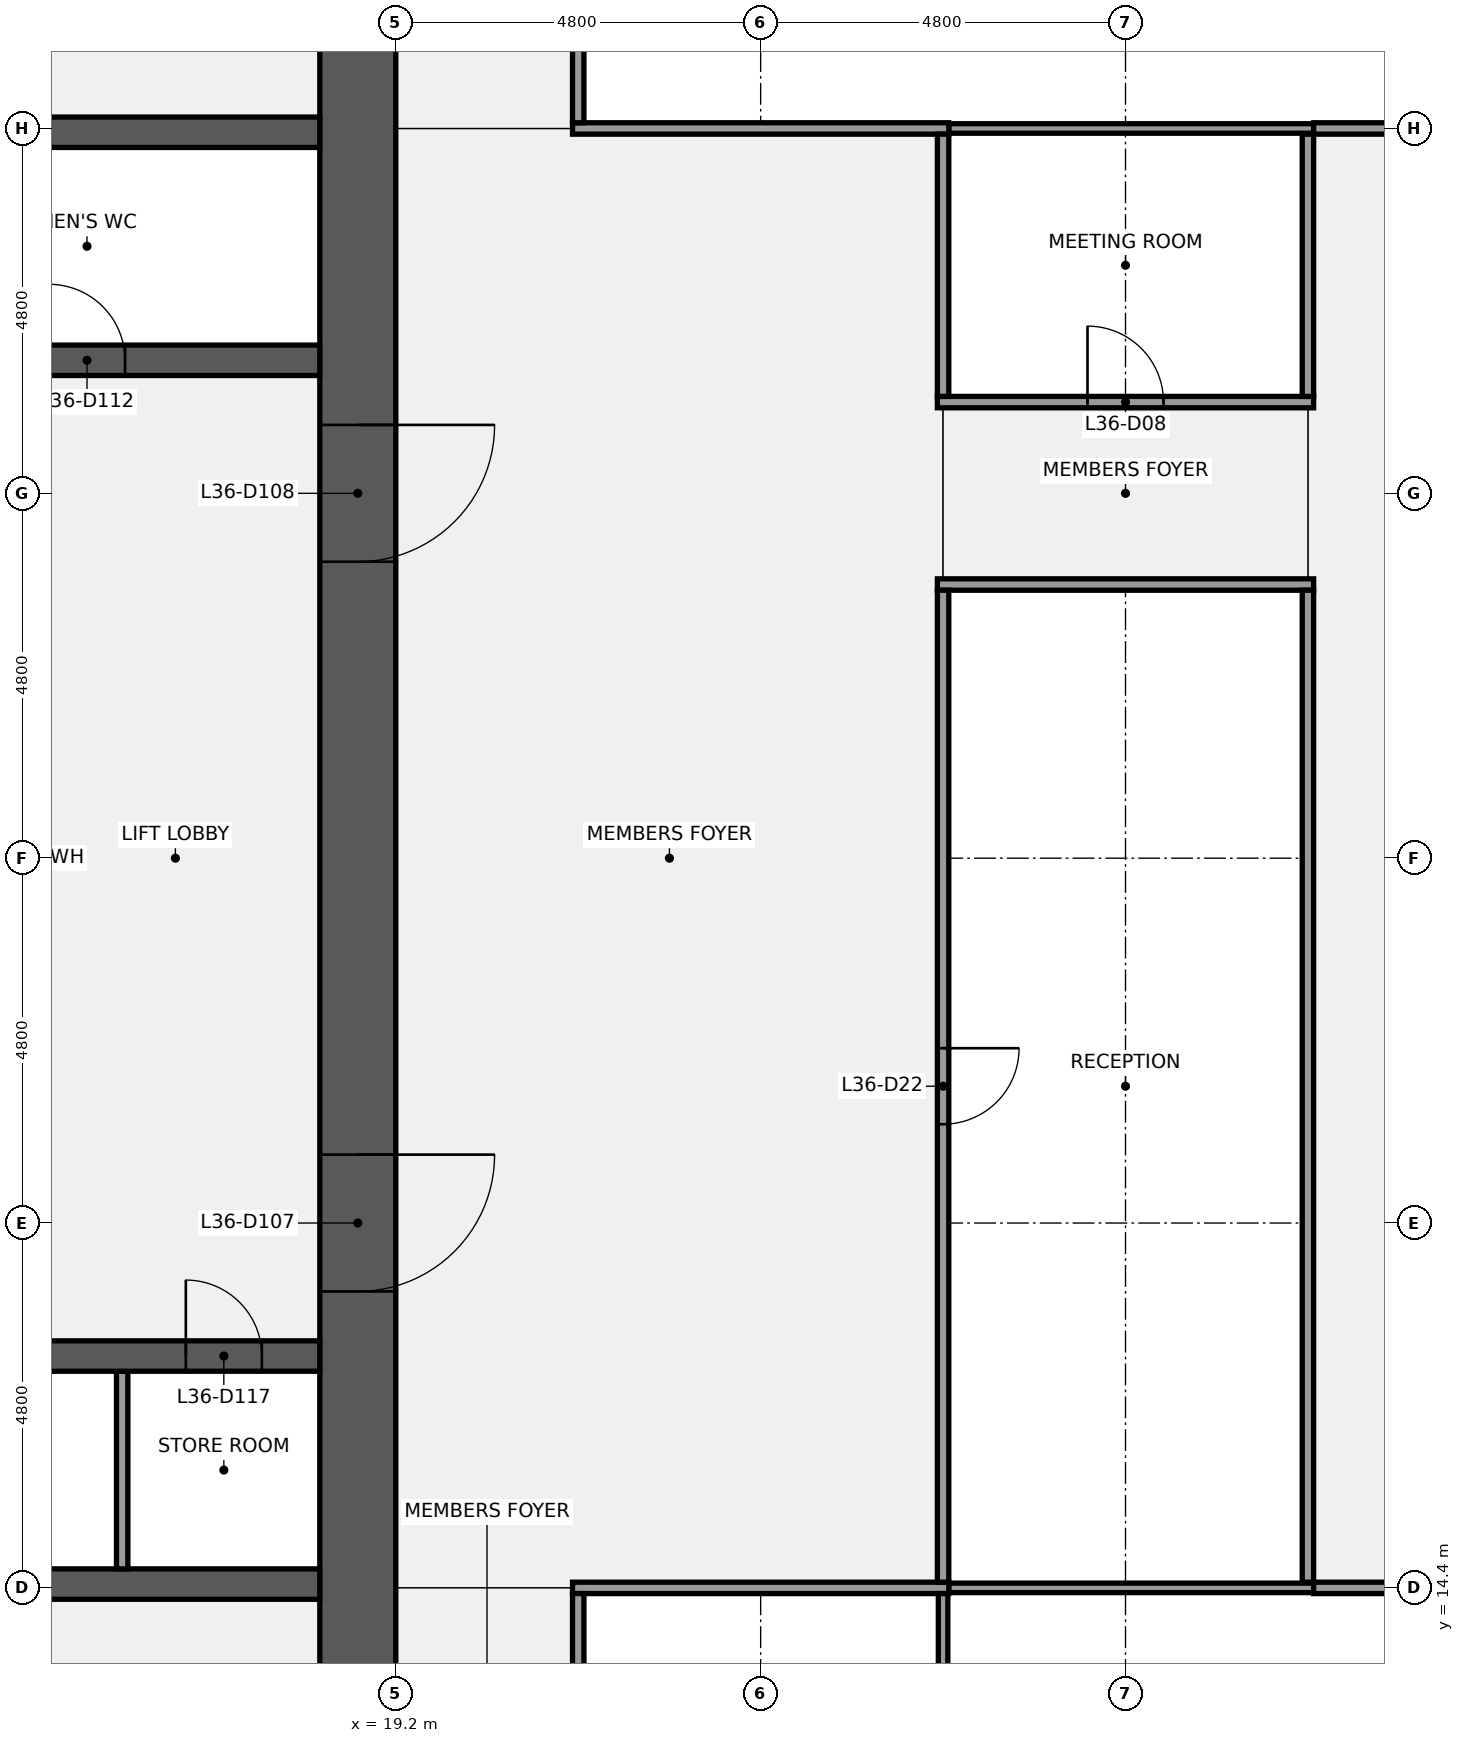
"""IFC4 building model, lengths in metres.
Left out: names, types, materials, properties, quantities, classifications, styles, units other than length and angle.
Written with IfcOpenShell. Run it as: python <this file> out.ifc"""

import sys

from ifc_helpers import new_model, si_unit, direction, frame, frame_2d, origin, place, context, subcontext, project, spatial, rectangle, extrude, element, fill, save


model = new_model("IFC4")
c1 = context("Model", 3, precision=1e-05, world=origin(), true_north=direction((0.0, 1.0)))
c2 = subcontext(c1, "Body", "Model", "MODEL_VIEW")
j1 = project(units=[si_unit("LENGTHUNIT", "METRE"), si_unit("PLANEANGLEUNIT", "RADIAN")], contexts=[c1])
p1 = place(None, origin())
s1 = spatial("IfcSite", under=j1, at=p1, CompositionType="ELEMENT")
p2 = place(p1, origin())
s2 = spatial("IfcBuilding", under=s1, at=p2, CompositionType="ELEMENT")
p3 = place(p2, frame((0.0, 0.0, 164.1)))
s3 = spatial("IfcBuildingStorey", under=s2, at=p3, CompositionType="ELEMENT", Elevation=164.1)
p4 = place(p3, frame((18.7, 38.4, 0.0), z_axis=(0.0, 0.0, 1.0), x_axis=(0.0, -1.0, 0.0)))
e1 = element("IfcWall", 1, at=p4, inside=s3, PredefinedType="SHEAR", context=c2, shape_type="SweptSolid", body=[
    extrude(rectangle(XDim=28.8, YDim=1.0, at=frame_2d((14.4, 0.0))), origin(), (0.0, 0.0, 1.0), 3.84),
])
p5 = place(p4, frame((18.3, 0.0, 0.0)))
e2 = element("IfcOpeningElement", 2, at=p5, cuts=e1, PredefinedType="OPENING", context=c2, shape_type="SweptSolid", body=[
    extrude(rectangle(XDim=1.8, YDim=2.1, at=frame_2d((0.9, 1.05))), frame((0.0, 0.51, 0.0), z_axis=(0.0, -1.0, 0.0), x_axis=(1.0, 0.0, 0.0)), (0.0, 0.0, 1.0), 1.02),
])
p6 = place(p4, frame((8.7, 0.0, 0.0)))
e3 = element("IfcOpeningElement", 3, at=p6, cuts=e1, PredefinedType="OPENING", context=c2, shape_type="SweptSolid", body=[
    extrude(rectangle(XDim=1.8, YDim=2.1, at=frame_2d((0.9, 1.05))), frame((0.0, 0.51, 0.0), z_axis=(0.0, -1.0, 0.0), x_axis=(1.0, 0.0, 0.0)), (0.0, 0.0, 1.0), 1.02),
])
p7 = place(p3, frame((1.0, 14.45, 0.0), z_axis=(0.0, 0.0, 1.0), x_axis=(1.0, 0.0, 0.0)))
e4 = element("IfcWall", 4, at=p7, inside=s3, PredefinedType="SHEAR", context=c2, shape_type="SweptSolid", body=[
    extrude(rectangle(XDim=17.2, YDim=0.4, at=frame_2d((8.6, 0.0))), origin(), (0.0, 0.0, 1.0), 3.84),
])
p8 = place(p3, frame((15.6, 14.65, 0.0), z_axis=(0.0, 0.0, 1.0), x_axis=(0.0, 1.0, 0.0)))
e5 = element("IfcWall", 5, at=p8, inside=s3, PredefinedType="PARTITIONING", context=c2, shape_type="SweptSolid", body=[
    extrude(rectangle(XDim=2.6, YDim=0.15, at=frame_2d((1.3, 0.0))), origin(), (0.0, 0.0, 1.0), 3.84),
])
p9 = place(p3, frame((1.0, 17.45, 0.0), z_axis=(0.0, 0.0, 1.0), x_axis=(1.0, 0.0, 0.0)))
e6 = element("IfcWall", 6, at=p9, inside=s3, PredefinedType="SHEAR", context=c2, shape_type="SweptSolid", body=[
    extrude(rectangle(XDim=17.2, YDim=0.4, at=frame_2d((8.6, 0.0))), origin(), (0.0, 0.0, 1.0), 3.84),
])
p10 = place(p9, frame((0.762, 0.0, 0.0)))
e7 = element("IfcOpeningElement", 7, at=p10, cuts=e6, PredefinedType="OPENING", context=c2, shape_type="SweptSolid", body=[
    extrude(rectangle(XDim=1.0, YDim=2.1, at=frame_2d((0.5, 1.05))), frame((0.0, 0.21, 0.0), z_axis=(0.0, -1.0, 0.0), x_axis=(1.0, 0.0, 0.0)), (0.0, 0.0, 1.0), 0.42),
])
p11 = place(p9, frame((3.6, 0.0, 0.0)))
e8 = element("IfcOpeningElement", 8, at=p11, cuts=e6, PredefinedType="OPENING", context=c2, shape_type="SweptSolid", body=[
    extrude(rectangle(XDim=1.0, YDim=2.1, at=frame_2d((0.5, 1.05))), frame((0.0, 0.21, 0.0), z_axis=(0.0, -1.0, 0.0), x_axis=(1.0, 0.0, 0.0)), (0.0, 0.0, 1.0), 0.42),
])
p12 = place(p9, frame((6.6, 0.0, 0.0)))
e9 = element("IfcOpeningElement", 9, at=p12, cuts=e6, PredefinedType="OPENING", context=c2, shape_type="SweptSolid", body=[
    extrude(rectangle(XDim=1.0, YDim=2.1, at=frame_2d((0.5, 1.05))), frame((0.0, 0.21, 0.0), z_axis=(0.0, -1.0, 0.0), x_axis=(1.0, 0.0, 0.0)), (0.0, 0.0, 1.0), 0.42),
])
p13 = place(p9, frame((11.1, 0.0, 0.0)))
e10 = element("IfcOpeningElement", 10, at=p13, cuts=e6, PredefinedType="OPENING", context=c2, shape_type="SweptSolid", body=[
    extrude(rectangle(XDim=1.0, YDim=2.1, at=frame_2d((0.5, 1.05))), frame((0.0, 0.21, 0.0), z_axis=(0.0, -1.0, 0.0), x_axis=(1.0, 0.0, 0.0)), (0.0, 0.0, 1.0), 0.42),
])
p14 = place(p9, frame((15.438, 0.0, 0.0)))
e11 = element("IfcOpeningElement", 11, at=p14, cuts=e6, PredefinedType="OPENING", context=c2, shape_type="SweptSolid", body=[
    extrude(rectangle(XDim=1.0, YDim=2.1, at=frame_2d((0.5, 1.05))), frame((0.0, 0.21, 0.0), z_axis=(0.0, -1.0, 0.0), x_axis=(1.0, 0.0, 0.0)), (0.0, 0.0, 1.0), 0.42),
])
p15 = place(p3, frame((1.0, 30.55, 0.0), z_axis=(0.0, 0.0, 1.0), x_axis=(1.0, 0.0, 0.0)))
e12 = element("IfcWall", 12, at=p15, inside=s3, PredefinedType="SHEAR", context=c2, shape_type="SweptSolid", body=[
    extrude(rectangle(XDim=17.2, YDim=0.4, at=frame_2d((8.6, 0.0))), origin(), (0.0, 0.0, 1.0), 3.84),
])
p16 = place(p15, frame((0.762, 0.0, 0.0)))
e13 = element("IfcOpeningElement", 13, at=p16, cuts=e12, PredefinedType="OPENING", context=c2, shape_type="SweptSolid", body=[
    extrude(rectangle(XDim=1.0, YDim=2.1, at=frame_2d((0.5, 1.05))), frame((0.0, 0.21, 0.0), z_axis=(0.0, -1.0, 0.0), x_axis=(1.0, 0.0, 0.0)), (0.0, 0.0, 1.0), 0.42),
])
p17 = place(p15, frame((4.2, 0.0, 0.0)))
e14 = element("IfcOpeningElement", 14, at=p17, cuts=e12, PredefinedType="OPENING", context=c2, shape_type="SweptSolid", body=[
    extrude(rectangle(XDim=1.0, YDim=2.1, at=frame_2d((0.5, 1.05))), frame((0.0, 0.21, 0.0), z_axis=(0.0, -1.0, 0.0), x_axis=(1.0, 0.0, 0.0)), (0.0, 0.0, 1.0), 0.42),
])
p18 = place(p15, frame((8.4, 0.0, 0.0)))
e15 = element("IfcOpeningElement", 15, at=p18, cuts=e12, PredefinedType="OPENING", context=c2, shape_type="SweptSolid", body=[
    extrude(rectangle(XDim=1.0, YDim=2.1, at=frame_2d((0.5, 1.05))), frame((0.0, 0.21, 0.0), z_axis=(0.0, -1.0, 0.0), x_axis=(1.0, 0.0, 0.0)), (0.0, 0.0, 1.0), 0.42),
])
p19 = place(p15, frame((13.637, 0.0, 0.0)))
e16 = element("IfcOpeningElement", 16, at=p19, cuts=e12, PredefinedType="OPENING", context=c2, shape_type="SweptSolid", body=[
    extrude(rectangle(XDim=1.0, YDim=2.1, at=frame_2d((0.5, 1.05))), frame((0.0, 0.21, 0.0), z_axis=(0.0, -1.0, 0.0), x_axis=(1.0, 0.0, 0.0)), (0.0, 0.0, 1.0), 0.42),
])
p20 = place(p3, frame((1.0, 33.55, 0.0), z_axis=(0.0, 0.0, 1.0), x_axis=(1.0, 0.0, 0.0)))
e17 = element("IfcWall", 17, at=p20, inside=s3, PredefinedType="SHEAR", context=c2, shape_type="SweptSolid", body=[
    extrude(rectangle(XDim=17.2, YDim=0.4, at=frame_2d((8.6, 0.0))), origin(), (0.0, 0.0, 1.0), 3.84),
])
p21 = place(p3, frame((26.475, 14.4, 0.0), z_axis=(0.0, 0.0, 1.0), x_axis=(1.0, 0.0, 0.0)))
e18 = element("IfcWall", 18, at=p21, inside=s3, PredefinedType="PARTITIONING", context=c2, shape_type="SweptSolid", body=[
    extrude(rectangle(XDim=4.8, YDim=0.125, at=frame_2d((2.4, 0.0))), origin(), (0.0, 0.0, 1.0), 2.936),
])
p22 = place(p3, frame((21.525, 14.4, 0.0), z_axis=(0.0, 0.0, 1.0), x_axis=(1.0, 0.0, 0.0)))
e19 = element("IfcWall", 19, at=p22, inside=s3, PredefinedType="PARTITIONING", context=c2, shape_type="SweptSolid", body=[
    extrude(rectangle(XDim=4.95, YDim=0.15, at=frame_2d((2.475, 0.0))), origin(), (0.0, 0.0, 1.0), 2.936),
])
p23 = place(p3, frame((31.275, 14.4, 0.0), z_axis=(0.0, 0.0, 1.0), x_axis=(1.0, 0.0, 0.0)))
e20 = element("IfcWall", 20, at=p23, inside=s3, PredefinedType="PARTITIONING", context=c2, shape_type="SweptSolid", body=[
    extrude(rectangle(XDim=4.8, YDim=0.15, at=frame_2d((2.4, 0.0))), origin(), (0.0, 0.0, 1.0), 2.936),
])
p24 = place(p3, frame((26.325, 27.6, 0.0), z_axis=(0.0, 0.0, 1.0), x_axis=(1.0, 0.0, 0.0)))
e21 = element("IfcWall", 21, at=p24, inside=s3, PredefinedType="PARTITIONING", context=c2, shape_type="SweptSolid", body=[
    extrude(rectangle(XDim=4.95, YDim=0.15, at=frame_2d((2.475, 0.0))), origin(), (0.0, 0.0, 1.0), 2.936),
])
p25 = place(p3, frame((26.325, 30.0, 0.0), z_axis=(0.0, 0.0, 1.0), x_axis=(1.0, 0.0, 0.0)))
e22 = element("IfcWall", 22, at=p25, inside=s3, PredefinedType="PARTITIONING", context=c2, shape_type="SweptSolid", body=[
    extrude(rectangle(XDim=4.95, YDim=0.15, at=frame_2d((2.475, 0.0))), origin(), (0.0, 0.0, 1.0), 2.936),
])
p26 = place(p25, frame((1.975, 0.0, 0.0)))
e23 = element("IfcOpeningElement", 23, at=p26, cuts=e22, PredefinedType="OPENING", context=c2, shape_type="SweptSolid", body=[
    extrude(rectangle(XDim=1.0, YDim=2.1, at=frame_2d((0.5, 1.05))), frame((0.0, 0.085, 0.0), z_axis=(0.0, -1.0, 0.0), x_axis=(1.0, 0.0, 0.0)), (0.0, 0.0, 1.0), 0.17),
])
p27 = place(p3, frame((26.475, 33.6, 0.0), z_axis=(0.0, 0.0, 1.0), x_axis=(1.0, 0.0, 0.0)))
e24 = element("IfcWall", 24, at=p27, inside=s3, PredefinedType="PARTITIONING", context=c2, shape_type="SweptSolid", body=[
    extrude(rectangle(XDim=4.8, YDim=0.125, at=frame_2d((2.4, 0.0))), origin(), (0.0, 0.0, 1.0), 2.936),
])
p28 = place(p3, frame((21.525, 33.6, 0.0), z_axis=(0.0, 0.0, 1.0), x_axis=(1.0, 0.0, 0.0)))
e25 = element("IfcWall", 25, at=p28, inside=s3, PredefinedType="PARTITIONING", context=c2, shape_type="SweptSolid", body=[
    extrude(rectangle(XDim=4.95, YDim=0.15, at=frame_2d((2.475, 0.0))), origin(), (0.0, 0.0, 1.0), 2.936),
])
p29 = place(p3, frame((31.275, 33.6, 0.0), z_axis=(0.0, 0.0, 1.0), x_axis=(1.0, 0.0, 0.0)))
e26 = element("IfcWall", 26, at=p29, inside=s3, PredefinedType="PARTITIONING", context=c2, shape_type="SweptSolid", body=[
    extrude(rectangle(XDim=4.8, YDim=0.15, at=frame_2d((2.4, 0.0))), origin(), (0.0, 0.0, 1.0), 2.936),
])
p30 = place(p3, frame((21.6, 9.675, 0.0), z_axis=(0.0, 0.0, 1.0), x_axis=(0.0, 1.0, 0.0)))
e27 = element("IfcWall", 27, at=p30, inside=s3, PredefinedType="PARTITIONING", context=c2, shape_type="SweptSolid", body=[
    extrude(rectangle(XDim=4.65, YDim=0.15, at=frame_2d((2.325, 0.0))), origin(), (0.0, 0.0, 1.0), 2.936),
])
p31 = place(p30, frame((1.825, 0.0, 0.0)))
e28 = element("IfcOpeningElement", 28, at=p31, cuts=e27, PredefinedType="OPENING", context=c2, shape_type="SweptSolid", body=[
    extrude(rectangle(XDim=1.0, YDim=2.1, at=frame_2d((0.5, 1.05))), frame((0.0, 0.085, 0.0), z_axis=(0.0, -1.0, 0.0), x_axis=(1.0, 0.0, 0.0)), (0.0, 0.0, 1.0), 0.17),
])
p32 = place(p3, frame((21.6, 33.675, 0.0), z_axis=(0.0, 0.0, 1.0), x_axis=(0.0, 1.0, 0.0)))
e29 = element("IfcWall", 29, at=p32, inside=s3, PredefinedType="PARTITIONING", context=c2, shape_type="SweptSolid", body=[
    extrude(rectangle(XDim=4.65, YDim=0.15, at=frame_2d((2.325, 0.0))), origin(), (0.0, 0.0, 1.0), 2.936),
])
p33 = place(p3, frame((26.4, 9.675, 0.0), z_axis=(0.0, 0.0, 1.0), x_axis=(0.0, 1.0, 0.0)))
e30 = element("IfcWall", 30, at=p33, inside=s3, PredefinedType="PARTITIONING", context=c2, shape_type="SweptSolid", body=[
    extrude(rectangle(XDim=4.65, YDim=0.125, at=frame_2d((2.325, 0.0))), origin(), (0.0, 0.0, 1.0), 2.936),
])
p34 = place(p3, frame((26.4, 14.475, 0.0), z_axis=(0.0, 0.0, 1.0), x_axis=(0.0, 1.0, 0.0)))
e31 = element("IfcWall", 31, at=p34, inside=s3, PredefinedType="PARTITIONING", context=c2, shape_type="SweptSolid", body=[
    extrude(rectangle(XDim=13.05, YDim=0.15, at=frame_2d((6.525, 0.0))), origin(), (0.0, 0.0, 1.0), 2.936),
])
p35 = place(p34, frame((6.025, 0.0, 0.0)))
e32 = element("IfcOpeningElement", 32, at=p35, cuts=e31, PredefinedType="OPENING", context=c2, shape_type="SweptSolid", body=[
    extrude(rectangle(XDim=1.0, YDim=2.1, at=frame_2d((0.5, 1.05))), frame((0.0, 0.085, 0.0), z_axis=(0.0, -1.0, 0.0), x_axis=(1.0, 0.0, 0.0)), (0.0, 0.0, 1.0), 0.17),
])
p36 = place(p3, frame((26.4, 30.075, 0.0), z_axis=(0.0, 0.0, 1.0), x_axis=(0.0, 1.0, 0.0)))
e33 = element("IfcWall", 33, at=p36, inside=s3, PredefinedType="PARTITIONING", context=c2, shape_type="SweptSolid", body=[
    extrude(rectangle(XDim=3.45, YDim=0.15, at=frame_2d((1.725, 0.0))), origin(), (0.0, 0.0, 1.0), 2.936),
])
p37 = place(p3, frame((31.2, 14.475, 0.0), z_axis=(0.0, 0.0, 1.0), x_axis=(0.0, 1.0, 0.0)))
e34 = element("IfcWall", 34, at=p37, inside=s3, PredefinedType="PARTITIONING", context=c2, shape_type="SweptSolid", body=[
    extrude(rectangle(XDim=13.05, YDim=0.15, at=frame_2d((6.525, 0.0))), origin(), (0.0, 0.0, 1.0), 2.936),
])
p38 = place(p3, frame((31.2, 30.075, 0.0), z_axis=(0.0, 0.0, 1.0), x_axis=(0.0, 1.0, 0.0)))
e35 = element("IfcWall", 35, at=p38, inside=s3, PredefinedType="PARTITIONING", context=c2, shape_type="SweptSolid", body=[
    extrude(rectangle(XDim=3.45, YDim=0.15, at=frame_2d((1.725, 0.0))), origin(), (0.0, 0.0, 1.0), 2.936),
])
p39 = place(p5, origin())
e36 = element("IfcDoor", 36, at=p39, inside=s3, OperationType="DOUBLE_DOOR_SINGLE_SWING", PredefinedType="DOOR", context=c2, shape_type="SweptSolid", body=[
    extrude(rectangle(XDim=1.8, YDim=2.1, at=frame_2d((0.9, 1.05))), frame((0.0, 0.025, 0.0), z_axis=(0.0, -1.0, 0.0), x_axis=(1.0, 0.0, 0.0)), (0.0, 0.0, 1.0), 0.05),
])
fill(e2, e36)
p40 = place(p6, origin())
e37 = element("IfcDoor", 37, at=p40, inside=s3, OperationType="DOUBLE_DOOR_SINGLE_SWING", PredefinedType="DOOR", context=c2, shape_type="SweptSolid", body=[
    extrude(rectangle(XDim=1.8, YDim=2.1, at=frame_2d((0.9, 1.05))), frame((0.0, 0.025, 0.0), z_axis=(0.0, -1.0, 0.0), x_axis=(1.0, 0.0, 0.0)), (0.0, 0.0, 1.0), 0.05),
])
fill(e3, e37)
p41 = place(p19, origin())
e38 = element("IfcDoor", 38, at=p41, inside=s3, OperationType="SINGLE_SWING_LEFT", PredefinedType="DOOR", context=c2, shape_type="SweptSolid", body=[
    extrude(rectangle(XDim=1.0, YDim=2.1, at=frame_2d((0.5, 1.05))), frame((0.0, 0.025, 0.0), z_axis=(0.0, -1.0, 0.0), x_axis=(1.0, 0.0, 0.0)), (0.0, 0.0, 1.0), 0.05),
])
fill(e16, e38)
p42 = place(p14, origin())
e39 = element("IfcDoor", 39, at=p42, inside=s3, OperationType="SINGLE_SWING_LEFT", PredefinedType="DOOR", context=c2, shape_type="SweptSolid", body=[
    extrude(rectangle(XDim=1.0, YDim=2.1, at=frame_2d((0.5, 1.05))), frame((0.0, 0.025, 0.0), z_axis=(0.0, -1.0, 0.0), x_axis=(1.0, 0.0, 0.0)), (0.0, 0.0, 1.0), 0.05),
])
fill(e11, e39)
p43 = place(p26, origin())
e40 = element("IfcDoor", 40, at=p43, inside=s3, OperationType="SINGLE_SWING_LEFT", PredefinedType="DOOR", context=c2, shape_type="SweptSolid", body=[
    extrude(rectangle(XDim=1.0, YDim=2.1, at=frame_2d((0.5, 1.05))), frame((0.0, 0.025, 0.0), z_axis=(0.0, -1.0, 0.0), x_axis=(1.0, 0.0, 0.0)), (0.0, 0.0, 1.0), 0.05),
])
fill(e23, e40)
p44 = place(p35, origin())
e41 = element("IfcDoor", 41, at=p44, inside=s3, OperationType="SINGLE_SWING_RIGHT", PredefinedType="DOOR", context=c2, shape_type="SweptSolid", body=[
    extrude(rectangle(XDim=1.0, YDim=2.1, at=frame_2d((0.5, 1.05))), frame((0.0, 0.025, 0.0), z_axis=(0.0, -1.0, 0.0), x_axis=(1.0, 0.0, 0.0)), (0.0, 0.0, 1.0), 0.05),
])
fill(e32, e41)
save(model, sys.argv[1])
